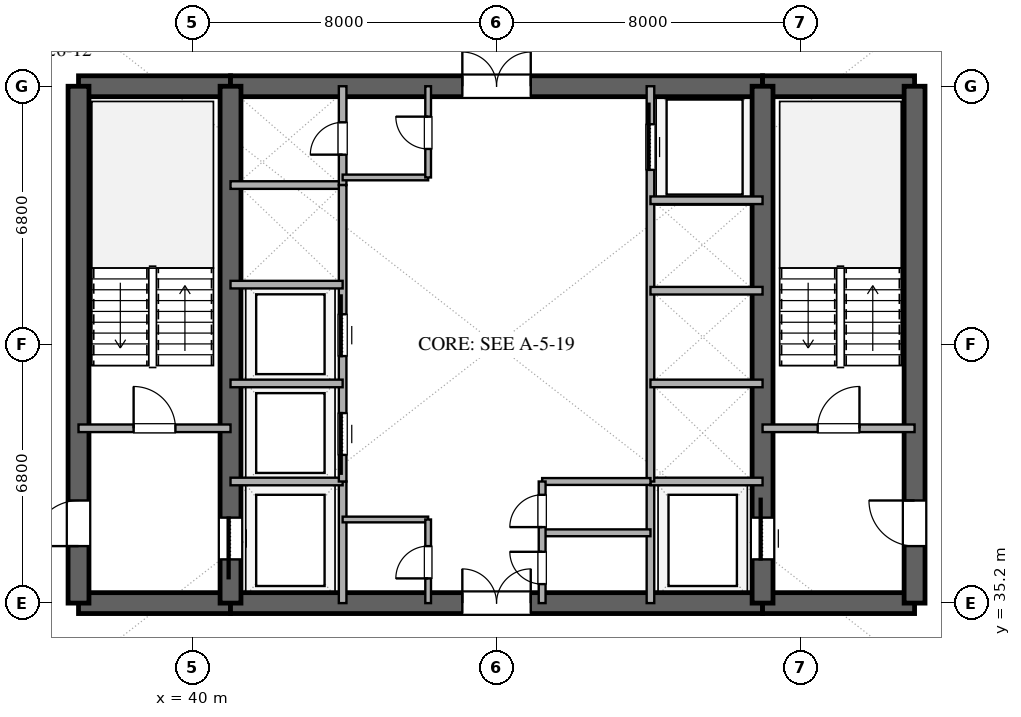
"""IFC4 building model, lengths in metres.
Left out: names, types, materials, properties, quantities, classifications, styles, units other than length and angle.
Written with IfcOpenShell. Run it as: python <this file> out.ifc"""

import sys

from ifc_helpers import new_model, si_unit, direction, frame, frame_2d, origin, place, context, subcontext, project, spatial, rectangle, extrude, element, fill, save


model = new_model("IFC4")
c1 = context("Model", 3, precision=1e-05, world=origin(), true_north=direction((0.0, 1.0)))
c2 = subcontext(c1, "Body", "Model", "MODEL_VIEW")
j1 = project(units=[si_unit("LENGTHUNIT", "METRE"), si_unit("PLANEANGLEUNIT", "RADIAN")], contexts=[c1])
p1 = place(None, origin())
s1 = spatial("IfcSite", under=j1, at=p1, CompositionType="ELEMENT")
p2 = place(p1, origin())
s2 = spatial("IfcBuilding", under=s1, at=p2, CompositionType="ELEMENT")
p3 = place(p2, frame((0.0, 0.0, 105.6)))
s3 = spatial("IfcBuildingStorey", under=s2, at=p3, CompositionType="ELEMENT", Elevation=105.6)
p4 = place(p3, frame((37.0, 35.2, 0.0), z_axis=(0.0, 0.0, 1.0), x_axis=(1.0, 0.0, 0.0)))
e1 = element("IfcWall", 1, at=p4, inside=s3, PredefinedType="SHEAR", context=c2, shape_type="SweptSolid", body=[
    extrude(rectangle(XDim=4.0, YDim=0.55, at=frame_2d((2.0, 0.0))), origin(), (0.0, 0.0, 1.0), 3.38),
])
p5 = place(p3, frame((41.0, 35.2, 0.0), z_axis=(0.0, 0.0, 1.0), x_axis=(1.0, 0.0, 0.0)))
e2 = element("IfcWall", 2, at=p5, inside=s3, PredefinedType="SHEAR", context=c2, shape_type="SweptSolid", body=[
    extrude(rectangle(XDim=14.0, YDim=0.55, at=frame_2d((7.0, 0.0))), origin(), (0.0, 0.0, 1.0), 3.38),
])
p6 = place(p5, frame((6.1, 0.0, 0.0)))
e3 = element("IfcOpeningElement", 3, at=p6, cuts=e2, PredefinedType="OPENING", context=c2, shape_type="SweptSolid", body=[
    extrude(rectangle(XDim=1.8, YDim=2.25, at=frame_2d((0.9, 1.125))), frame((0.0, 0.285, 0.0), z_axis=(0.0, -1.0, 0.0), x_axis=(1.0, 0.0, 0.0)), (0.0, 0.0, 1.0), 0.57),
])
for number, where, z_axis, x_axis in (
    (4, (55.0, 35.2, 0.0), (0.0, 0.0, 1.0), (1.0, 0.0, 0.0)),
    (5, (37.0, 48.8, 0.0), (0.0, 0.0, 1.0), (1.0, 0.0, 0.0)),
):
    element("IfcWall", number, at=place(p3, frame(where, z_axis=z_axis, x_axis=x_axis)), inside=s3, PredefinedType="SHEAR", context=c2, shape_type="SweptSolid", body=[
        extrude(rectangle(XDim=4.0, YDim=0.55, at=frame_2d((2.0, 0.0))), origin(), (0.0, 0.0, 1.0), 3.38),
    ])
p7 = place(p3, frame((41.0, 48.8, 0.0), z_axis=(0.0, 0.0, 1.0), x_axis=(1.0, 0.0, 0.0)))
e6 = element("IfcWall", 6, at=p7, inside=s3, PredefinedType="SHEAR", context=c2, shape_type="SweptSolid", body=[
    extrude(rectangle(XDim=14.0, YDim=0.55, at=frame_2d((7.0, 0.0))), origin(), (0.0, 0.0, 1.0), 3.38),
])
p8 = place(p7, frame((6.1, 0.0, 0.0)))
e7 = element("IfcOpeningElement", 7, at=p8, cuts=e6, PredefinedType="OPENING", context=c2, shape_type="SweptSolid", body=[
    extrude(rectangle(XDim=1.8, YDim=2.25, at=frame_2d((0.9, 1.125))), frame((0.0, 0.285, 0.0), z_axis=(0.0, -1.0, 0.0), x_axis=(1.0, 0.0, 0.0)), (0.0, 0.0, 1.0), 0.57),
])
p9 = place(p3, frame((55.0, 48.8, 0.0), z_axis=(0.0, 0.0, 1.0), x_axis=(1.0, 0.0, 0.0)))
e8 = element("IfcWall", 8, at=p9, inside=s3, PredefinedType="SHEAR", context=c2, shape_type="SweptSolid", body=[
    extrude(rectangle(XDim=4.0, YDim=0.55, at=frame_2d((2.0, 0.0))), origin(), (0.0, 0.0, 1.0), 3.38),
])
p10 = place(p3, frame((37.0, 35.2, 0.0), z_axis=(0.0, 0.0, 1.0), x_axis=(0.0, 1.0, 0.0)))
e9 = element("IfcWall", 9, at=p10, inside=s3, PredefinedType="SHEAR", context=c2, shape_type="SweptSolid", body=[
    extrude(rectangle(XDim=13.6, YDim=0.55, at=frame_2d((6.8, 0.0))), origin(), (0.0, 0.0, 1.0), 3.38),
])
p11 = place(p10, frame((1.5, 0.0, 0.0)))
e10 = element("IfcOpeningElement", 10, at=p11, cuts=e9, PredefinedType="OPENING", context=c2, shape_type="SweptSolid", body=[
    extrude(rectangle(XDim=1.2, YDim=2.15, at=frame_2d((0.6, 1.075))), frame((0.0, 0.285, 0.0), z_axis=(0.0, -1.0, 0.0), x_axis=(1.0, 0.0, 0.0)), (0.0, 0.0, 1.0), 0.57),
])
p12 = place(p3, frame((59.0, 35.2, 0.0), z_axis=(0.0, 0.0, 1.0), x_axis=(0.0, 1.0, 0.0)))
e11 = element("IfcWall", 11, at=p12, inside=s3, PredefinedType="SHEAR", context=c2, shape_type="SweptSolid", body=[
    extrude(rectangle(XDim=13.6, YDim=0.55, at=frame_2d((6.8, 0.0))), origin(), (0.0, 0.0, 1.0), 3.38),
])
p13 = place(p12, frame((1.5, 0.0, 0.0)))
e12 = element("IfcOpeningElement", 12, at=p13, cuts=e11, PredefinedType="OPENING", context=c2, shape_type="SweptSolid", body=[
    extrude(rectangle(XDim=1.2, YDim=2.15, at=frame_2d((0.6, 1.075))), frame((0.0, 0.285, 0.0), z_axis=(0.0, -1.0, 0.0), x_axis=(1.0, 0.0, 0.0)), (0.0, 0.0, 1.0), 0.57),
])
p14 = place(p3, frame((41.0, 35.2, 0.0), z_axis=(0.0, 0.0, 1.0), x_axis=(0.0, 1.0, 0.0)))
e13 = element("IfcWall", 13, at=p14, inside=s3, PredefinedType="SHEAR", context=c2, shape_type="SweptSolid", body=[
    extrude(rectangle(XDim=13.6, YDim=0.55, at=frame_2d((6.8, 0.0))), origin(), (0.0, 0.0, 1.0), 3.38),
])
p15 = place(p14, frame((1.15, 0.0, 0.0)))
e14 = element("IfcOpeningElement", 14, at=p15, cuts=e13, PredefinedType="OPENING", context=c2, shape_type="SweptSolid", body=[
    extrude(rectangle(XDim=1.1, YDim=2.2, at=frame_2d((0.55, 1.1))), frame((0.0, 0.285, 0.0), z_axis=(0.0, -1.0, 0.0), x_axis=(1.0, 0.0, 0.0)), (0.0, 0.0, 1.0), 0.57),
])
p16 = place(p3, frame((55.0, 35.2, 0.0), z_axis=(0.0, 0.0, 1.0), x_axis=(0.0, 1.0, 0.0)))
e15 = element("IfcWall", 15, at=p16, inside=s3, PredefinedType="SHEAR", context=c2, shape_type="SweptSolid", body=[
    extrude(rectangle(XDim=13.6, YDim=0.55, at=frame_2d((6.8, 0.0))), origin(), (0.0, 0.0, 1.0), 3.38),
])
p17 = place(p16, frame((1.15, 0.0, 0.0)))
e16 = element("IfcOpeningElement", 16, at=p17, cuts=e15, PredefinedType="OPENING", context=c2, shape_type="SweptSolid", body=[
    extrude(rectangle(XDim=1.1, YDim=2.2, at=frame_2d((0.55, 1.1))), frame((0.0, 0.285, 0.0), z_axis=(0.0, -1.0, 0.0), x_axis=(1.0, 0.0, 0.0)), (0.0, 0.0, 1.0), 0.57),
])
p18 = place(p3, frame((37.0, 39.8, 0.0), z_axis=(0.0, 0.0, 1.0), x_axis=(1.0, 0.0, 0.0)))
e17 = element("IfcWall", 17, at=p18, inside=s3, PredefinedType="SOLIDWALL", context=c2, shape_type="SweptSolid", body=[
    extrude(rectangle(XDim=4.0, YDim=0.2, at=frame_2d((2.0, 0.0))), origin(), (0.0, 0.0, 1.0), 2.74),
])
p19 = place(p18, frame((1.45, 0.0, 0.0)))
e18 = element("IfcOpeningElement", 18, at=p19, cuts=e17, PredefinedType="OPENING", context=c2, shape_type="SweptSolid", body=[
    extrude(rectangle(XDim=1.1, YDim=2.15, at=frame_2d((0.55, 1.075))), frame((0.0, 0.11, 0.0), z_axis=(0.0, -1.0, 0.0), x_axis=(1.0, 0.0, 0.0)), (0.0, 0.0, 1.0), 0.22),
])
p20 = place(p3, frame((55.0, 39.8, 0.0), z_axis=(0.0, 0.0, 1.0), x_axis=(1.0, 0.0, 0.0)))
e19 = element("IfcWall", 19, at=p20, inside=s3, PredefinedType="SOLIDWALL", context=c2, shape_type="SweptSolid", body=[
    extrude(rectangle(XDim=4.0, YDim=0.2, at=frame_2d((2.0, 0.0))), origin(), (0.0, 0.0, 1.0), 2.74),
])
p21 = place(p20, frame((1.45, 0.0, 0.0)))
e20 = element("IfcOpeningElement", 20, at=p21, cuts=e19, PredefinedType="OPENING", context=c2, shape_type="SweptSolid", body=[
    extrude(rectangle(XDim=1.1, YDim=2.15, at=frame_2d((0.55, 1.075))), frame((0.0, 0.11, 0.0), z_axis=(0.0, -1.0, 0.0), x_axis=(1.0, 0.0, 0.0)), (0.0, 0.0, 1.0), 0.22),
])
p22 = place(p3, frame((43.95, 35.2, 0.0), z_axis=(0.0, 0.0, 1.0), x_axis=(0.0, 1.0, 0.0)))
e21 = element("IfcWall", 21, at=p22, inside=s3, PredefinedType="SOLIDWALL", context=c2, shape_type="SweptSolid", body=[
    extrude(rectangle(XDim=3.2, YDim=0.2, at=frame_2d((1.6, 0.0))), origin(), (0.0, 0.0, 1.0), 2.74),
])
p23 = place(p3, frame((41.0, 38.4, 0.0), z_axis=(0.0, 0.0, 1.0), x_axis=(1.0, 0.0, 0.0)))
e22 = element("IfcWall", 22, at=p23, inside=s3, PredefinedType="SOLIDWALL", context=c2, shape_type="SweptSolid", body=[
    extrude(rectangle(XDim=2.95, YDim=0.2, at=frame_2d((1.475, 0.0))), origin(), (0.0, 0.0, 1.0), 2.74),
])
p24 = place(p3, frame((52.05, 35.2, 0.0), z_axis=(0.0, 0.0, 1.0), x_axis=(0.0, 1.0, 0.0)))
e23 = element("IfcWall", 23, at=p24, inside=s3, PredefinedType="SOLIDWALL", context=c2, shape_type="SweptSolid", body=[
    extrude(rectangle(XDim=3.2, YDim=0.2, at=frame_2d((1.6, 0.0))), origin(), (0.0, 0.0, 1.0), 2.74),
])
for number, where, z_axis, x_axis in (
    (24, (52.05, 38.4, 0.0), (0.0, 0.0, 1.0), (1.0, 0.0, 0.0)),
    (25, (41.0, 46.2, 0.0), (0.0, 0.0, 1.0), (1.0, 0.0, 0.0)),
):
    element("IfcWall", number, at=place(p3, frame(where, z_axis=z_axis, x_axis=x_axis)), inside=s3, PredefinedType="SOLIDWALL", context=c2, shape_type="SweptSolid", body=[
        extrude(rectangle(XDim=2.95, YDim=0.2, at=frame_2d((1.475, 0.0))), origin(), (0.0, 0.0, 1.0), 2.74),
    ])
p25 = place(p3, frame((43.95, 46.2, 0.0), z_axis=(0.0, 0.0, 1.0), x_axis=(0.0, 1.0, 0.0)))
e26 = element("IfcWall", 26, at=p25, inside=s3, PredefinedType="SOLIDWALL", context=c2, shape_type="SweptSolid", body=[
    extrude(rectangle(XDim=2.6, YDim=0.2, at=frame_2d((1.3, 0.0))), origin(), (0.0, 0.0, 1.0), 2.74),
])
p26 = place(p25, frame((0.8, 0.0, 0.0)))
e27 = element("IfcOpeningElement", 27, at=p26, cuts=e26, PredefinedType="OPENING", context=c2, shape_type="SweptSolid", body=[
    extrude(rectangle(XDim=0.85, YDim=2.15, at=frame_2d((0.425, 1.075))), frame((0.0, 0.11, 0.0), z_axis=(0.0, -1.0, 0.0), x_axis=(1.0, 0.0, 0.0)), (0.0, 0.0, 1.0), 0.22),
])
p27 = place(p3, frame((43.95, 38.4, 0.0), z_axis=(0.0, 0.0, 1.0), x_axis=(0.0, 1.0, 0.0)))
e28 = element("IfcWall", 28, at=p27, inside=s3, PredefinedType="SOLIDWALL", context=c2, shape_type="SweptSolid", body=[
    extrude(rectangle(XDim=7.8, YDim=0.2, at=frame_2d((3.9, 0.0))), origin(), (0.0, 0.0, 1.0), 2.74),
])
p28 = place(p27, frame((0.7, 0.0, 0.0)))
e29 = element("IfcOpeningElement", 29, at=p28, cuts=e28, PredefinedType="OPENING", context=c2, shape_type="SweptSolid", body=[
    extrude(rectangle(XDim=1.1, YDim=2.2, at=frame_2d((0.55, 1.1))), frame((0.0, 0.11, 0.0), z_axis=(0.0, -1.0, 0.0), x_axis=(1.0, 0.0, 0.0)), (0.0, 0.0, 1.0), 0.22),
])
p29 = place(p27, frame((3.3, 0.0, 0.0)))
e30 = element("IfcOpeningElement", 30, at=p29, cuts=e28, PredefinedType="OPENING", context=c2, shape_type="SweptSolid", body=[
    extrude(rectangle(XDim=1.1, YDim=2.2, at=frame_2d((0.55, 1.1))), frame((0.0, 0.11, 0.0), z_axis=(0.0, -1.0, 0.0), x_axis=(1.0, 0.0, 0.0)), (0.0, 0.0, 1.0), 0.22),
])
for number, where, z_axis, x_axis in (
    (31, (41.0, 40.98, 0.0), (0.0, 0.0, 1.0), (1.0, 0.0, 0.0)),
    (32, (41.0, 43.58, 0.0), (0.0, 0.0, 1.0), (1.0, 0.0, 0.0)),
):
    element("IfcWall", number, at=place(p3, frame(where, z_axis=z_axis, x_axis=x_axis)), inside=s3, PredefinedType="SOLIDWALL", context=c2, shape_type="SweptSolid", body=[
        extrude(rectangle(XDim=2.95, YDim=0.2, at=frame_2d((1.475, 0.0))), origin(), (0.0, 0.0, 1.0), 2.74),
    ])
p30 = place(p3, frame((52.05, 38.4, 0.0), z_axis=(0.0, 0.0, 1.0), x_axis=(0.0, 1.0, 0.0)))
e33 = element("IfcWall", 33, at=p30, inside=s3, PredefinedType="SOLIDWALL", context=c2, shape_type="SweptSolid", body=[
    extrude(rectangle(XDim=10.4, YDim=0.2, at=frame_2d((5.2, 0.0))), origin(), (0.0, 0.0, 1.0), 2.74),
])
p31 = place(p30, frame((8.2, 0.0, 0.0)))
e34 = element("IfcOpeningElement", 34, at=p31, cuts=e33, PredefinedType="OPENING", context=c2, shape_type="SweptSolid", body=[
    extrude(rectangle(XDim=1.2, YDim=2.2, at=frame_2d((0.6, 1.1))), frame((0.0, 0.11, 0.0), z_axis=(0.0, -1.0, 0.0), x_axis=(1.0, 0.0, 0.0)), (0.0, 0.0, 1.0), 0.22),
])
for number, where, z_axis, x_axis in (
    (35, (52.05, 40.98, 0.0), (0.0, 0.0, 1.0), (1.0, 0.0, 0.0)),
    (36, (52.05, 43.42, 0.0), (0.0, 0.0, 1.0), (1.0, 0.0, 0.0)),
    (37, (52.05, 45.8, 0.0), (0.0, 0.0, 1.0), (1.0, 0.0, 0.0)),
):
    element("IfcWall", number, at=place(p3, frame(where, z_axis=z_axis, x_axis=x_axis)), inside=s3, PredefinedType="SOLIDWALL", context=c2, shape_type="SweptSolid", body=[
        extrude(rectangle(XDim=2.95, YDim=0.2, at=frame_2d((1.475, 0.0))), origin(), (0.0, 0.0, 1.0), 2.74),
    ])
p32 = place(p3, frame((43.95, 37.4, 0.0), z_axis=(0.0, 0.0, 1.0), x_axis=(1.0, 0.0, 0.0)))
e38 = element("IfcWall", 38, at=p32, inside=s3, PredefinedType="PARTITIONING", context=c2, shape_type="SweptSolid", body=[
    extrude(rectangle(XDim=2.25, YDim=0.15, at=frame_2d((1.125, 0.0))), origin(), (0.0, 0.0, 1.0), 2.74),
])
p33 = place(p3, frame((46.2, 35.2, 0.0), z_axis=(0.0, 0.0, 1.0), x_axis=(0.0, 1.0, 0.0)))
e39 = element("IfcWall", 39, at=p33, inside=s3, PredefinedType="PARTITIONING", context=c2, shape_type="SweptSolid", body=[
    extrude(rectangle(XDim=2.2, YDim=0.15, at=frame_2d((1.1, 0.0))), origin(), (0.0, 0.0, 1.0), 2.74),
])
p34 = place(p33, frame((0.65, 0.0, 0.0)))
e40 = element("IfcOpeningElement", 40, at=p34, cuts=e39, PredefinedType="OPENING", context=c2, shape_type="SweptSolid", body=[
    extrude(rectangle(XDim=0.85, YDim=2.15, at=frame_2d((0.425, 1.075))), frame((0.0, 0.085, 0.0), z_axis=(0.0, -1.0, 0.0), x_axis=(1.0, 0.0, 0.0)), (0.0, 0.0, 1.0), 0.17),
])
p35 = place(p3, frame((43.95, 46.4, 0.0), z_axis=(0.0, 0.0, 1.0), x_axis=(1.0, 0.0, 0.0)))
e41 = element("IfcWall", 41, at=p35, inside=s3, PredefinedType="PARTITIONING", context=c2, shape_type="SweptSolid", body=[
    extrude(rectangle(XDim=2.25, YDim=0.15, at=frame_2d((1.125, 0.0))), origin(), (0.0, 0.0, 1.0), 2.74),
])
p36 = place(p3, frame((46.2, 46.4, 0.0), z_axis=(0.0, 0.0, 1.0), x_axis=(0.0, 1.0, 0.0)))
e42 = element("IfcWall", 42, at=p36, inside=s3, PredefinedType="PARTITIONING", context=c2, shape_type="SweptSolid", body=[
    extrude(rectangle(XDim=2.4, YDim=0.15, at=frame_2d((1.2, 0.0))), origin(), (0.0, 0.0, 1.0), 2.74),
])
p37 = place(p36, frame((0.75, 0.0, 0.0)))
e43 = element("IfcOpeningElement", 43, at=p37, cuts=e42, PredefinedType="OPENING", context=c2, shape_type="SweptSolid", body=[
    extrude(rectangle(XDim=0.85, YDim=2.15, at=frame_2d((0.425, 1.075))), frame((0.0, 0.085, 0.0), z_axis=(0.0, -1.0, 0.0), x_axis=(1.0, 0.0, 0.0)), (0.0, 0.0, 1.0), 0.17),
])
for number, where, z_axis, x_axis in (
    (44, (49.2, 37.05, 0.0), (0.0, 0.0, 1.0), (1.0, 0.0, 0.0)),
    (45, (49.2, 38.4, 0.0), (0.0, 0.0, 1.0), (1.0, 0.0, 0.0)),
):
    element("IfcWall", number, at=place(p3, frame(where, z_axis=z_axis, x_axis=x_axis)), inside=s3, PredefinedType="PLUMBINGWALL", context=c2, shape_type="SweptSolid", body=[
        extrude(rectangle(XDim=2.85, YDim=0.18, at=frame_2d((1.425, 0.0))), origin(), (0.0, 0.0, 1.0), 2.74),
    ])
p38 = place(p3, frame((49.2, 35.2, 0.0), z_axis=(0.0, 0.0, 1.0), x_axis=(0.0, 1.0, 0.0)))
e46 = element("IfcWall", 46, at=p38, inside=s3, PredefinedType="PLUMBINGWALL", context=c2, shape_type="SweptSolid", body=[
    extrude(rectangle(XDim=3.2, YDim=0.18, at=frame_2d((1.6, 0.0))), origin(), (0.0, 0.0, 1.0), 2.74),
])
p39 = place(p38, frame((0.5, 0.0, 0.0)))
e47 = element("IfcOpeningElement", 47, at=p39, cuts=e46, PredefinedType="OPENING", context=c2, shape_type="SweptSolid", body=[
    extrude(rectangle(XDim=0.85, YDim=2.1, at=frame_2d((0.425, 1.05))), frame((0.0, 0.1, 0.0), z_axis=(0.0, -1.0, 0.0), x_axis=(1.0, 0.0, 0.0)), (0.0, 0.0, 1.0), 0.2),
])
p40 = place(p38, frame((2.0, 0.0, 0.0)))
e48 = element("IfcOpeningElement", 48, at=p40, cuts=e46, PredefinedType="OPENING", context=c2, shape_type="SweptSolid", body=[
    extrude(rectangle(XDim=0.85, YDim=2.15, at=frame_2d((0.425, 1.075))), frame((0.0, 0.1, 0.0), z_axis=(0.0, -1.0, 0.0), x_axis=(1.0, 0.0, 0.0)), (0.0, 0.0, 1.0), 0.2),
])
p41 = place(p15, origin())
e49 = element("IfcDoor", 49, at=p41, inside=s3, OperationType="SLIDING_TO_LEFT", PredefinedType="DOOR", context=c2, shape_type="SweptSolid", body=[
    extrude(rectangle(XDim=1.1, YDim=2.2, at=frame_2d((0.55, 1.1))), frame((0.0, 0.025, 0.0), z_axis=(0.0, -1.0, 0.0), x_axis=(1.0, 0.0, 0.0)), (0.0, 0.0, 1.0), 0.05),
])
fill(e14, e49)
p42 = place(p17, origin())
e50 = element("IfcDoor", 50, at=p42, inside=s3, OperationType="SLIDING_TO_RIGHT", PredefinedType="DOOR", context=c2, shape_type="SweptSolid", body=[
    extrude(rectangle(XDim=1.1, YDim=2.2, at=frame_2d((0.55, 1.1))), frame((0.0, 0.025, 0.0), z_axis=(0.0, -1.0, 0.0), x_axis=(1.0, 0.0, 0.0)), (0.0, 0.0, 1.0), 0.05),
])
fill(e16, e50)
p43 = place(p11, origin())
e51 = element("IfcDoor", 51, at=p43, inside=s3, OperationType="SINGLE_SWING_LEFT", PredefinedType="DOOR", context=c2, shape_type="SweptSolid", body=[
    extrude(rectangle(XDim=1.2, YDim=2.15, at=frame_2d((0.6, 1.075))), frame((0.0, 0.025, 0.0), z_axis=(0.0, -1.0, 0.0), x_axis=(1.0, 0.0, 0.0)), (0.0, 0.0, 1.0), 0.05),
])
fill(e10, e51)
p44 = place(p13, origin())
e52 = element("IfcDoor", 52, at=p44, inside=s3, OperationType="SINGLE_SWING_RIGHT", PredefinedType="DOOR", context=c2, shape_type="SweptSolid", body=[
    extrude(rectangle(XDim=1.2, YDim=2.15, at=frame_2d((0.6, 1.075))), frame((0.0, 0.025, 0.0), z_axis=(0.0, -1.0, 0.0), x_axis=(1.0, 0.0, 0.0)), (0.0, 0.0, 1.0), 0.05),
])
fill(e12, e52)
p45 = place(p6, origin())
e53 = element("IfcDoor", 53, at=p45, inside=s3, OperationType="DOUBLE_DOOR_SINGLE_SWING", PredefinedType="DOOR", context=c2, shape_type="SweptSolid", body=[
    extrude(rectangle(XDim=1.8, YDim=2.25, at=frame_2d((0.9, 1.125))), frame((0.0, 0.025, 0.0), z_axis=(0.0, -1.0, 0.0), x_axis=(1.0, 0.0, 0.0)), (0.0, 0.0, 1.0), 0.05),
])
fill(e3, e53)
p46 = place(p8, origin())
e54 = element("IfcDoor", 54, at=p46, inside=s3, OperationType="DOUBLE_DOOR_SINGLE_SWING", PredefinedType="DOOR", context=c2, shape_type="SweptSolid", body=[
    extrude(rectangle(XDim=1.8, YDim=2.25, at=frame_2d((0.9, 1.125))), frame((0.0, 0.025, 0.0), z_axis=(0.0, -1.0, 0.0), x_axis=(1.0, 0.0, 0.0)), (0.0, 0.0, 1.0), 0.05),
])
fill(e7, e54)
p47 = place(p19, origin())
e55 = element("IfcDoor", 55, at=p47, inside=s3, OperationType="SINGLE_SWING_LEFT", PredefinedType="DOOR", context=c2, shape_type="SweptSolid", body=[
    extrude(rectangle(XDim=1.1, YDim=2.15, at=frame_2d((0.55, 1.075))), frame((0.0, 0.025, 0.0), z_axis=(0.0, -1.0, 0.0), x_axis=(1.0, 0.0, 0.0)), (0.0, 0.0, 1.0), 0.05),
])
fill(e18, e55)
p48 = place(p21, origin())
e56 = element("IfcDoor", 56, at=p48, inside=s3, OperationType="SINGLE_SWING_RIGHT", PredefinedType="DOOR", context=c2, shape_type="SweptSolid", body=[
    extrude(rectangle(XDim=1.1, YDim=2.15, at=frame_2d((0.55, 1.075))), frame((0.0, 0.025, 0.0), z_axis=(0.0, -1.0, 0.0), x_axis=(1.0, 0.0, 0.0)), (0.0, 0.0, 1.0), 0.05),
])
fill(e20, e56)
p49 = place(p26, origin())
e57 = element("IfcDoor", 57, at=p49, inside=s3, OperationType="SINGLE_SWING_LEFT", PredefinedType="DOOR", context=c2, shape_type="SweptSolid", body=[
    extrude(rectangle(XDim=0.85, YDim=2.15, at=frame_2d((0.425, 1.075))), frame((0.0, 0.025, 0.0), z_axis=(0.0, -1.0, 0.0), x_axis=(1.0, 0.0, 0.0)), (0.0, 0.0, 1.0), 0.05),
])
fill(e27, e57)
p50 = place(p28, origin())
e58 = element("IfcDoor", 58, at=p50, inside=s3, OperationType="SLIDING_TO_LEFT", PredefinedType="DOOR", context=c2, shape_type="SweptSolid", body=[
    extrude(rectangle(XDim=1.1, YDim=2.2, at=frame_2d((0.55, 1.1))), frame((0.0, 0.025, 0.0), z_axis=(0.0, -1.0, 0.0), x_axis=(1.0, 0.0, 0.0)), (0.0, 0.0, 1.0), 0.05),
])
fill(e29, e58)
p51 = place(p29, origin())
e59 = element("IfcDoor", 59, at=p51, inside=s3, OperationType="SLIDING_TO_RIGHT", PredefinedType="DOOR", context=c2, shape_type="SweptSolid", body=[
    extrude(rectangle(XDim=1.1, YDim=2.2, at=frame_2d((0.55, 1.1))), frame((0.0, 0.025, 0.0), z_axis=(0.0, -1.0, 0.0), x_axis=(1.0, 0.0, 0.0)), (0.0, 0.0, 1.0), 0.05),
])
fill(e30, e59)
p52 = place(p31, origin())
e60 = element("IfcDoor", 60, at=p52, inside=s3, OperationType="SLIDING_TO_RIGHT", PredefinedType="DOOR", context=c2, shape_type="SweptSolid", body=[
    extrude(rectangle(XDim=1.2, YDim=2.2, at=frame_2d((0.6, 1.1))), frame((0.0, 0.025, 0.0), z_axis=(0.0, -1.0, 0.0), x_axis=(1.0, 0.0, 0.0)), (0.0, 0.0, 1.0), 0.05),
])
fill(e34, e60)
p53 = place(p34, origin())
e61 = element("IfcDoor", 61, at=p53, inside=s3, OperationType="SINGLE_SWING_LEFT", PredefinedType="DOOR", context=c2, shape_type="SweptSolid", body=[
    extrude(rectangle(XDim=0.85, YDim=2.15, at=frame_2d((0.425, 1.075))), frame((0.0, 0.025, 0.0), z_axis=(0.0, -1.0, 0.0), x_axis=(1.0, 0.0, 0.0)), (0.0, 0.0, 1.0), 0.05),
])
fill(e40, e61)
p54 = place(p37, origin())
e62 = element("IfcDoor", 62, at=p54, inside=s3, OperationType="SINGLE_SWING_RIGHT", PredefinedType="DOOR", context=c2, shape_type="SweptSolid", body=[
    extrude(rectangle(XDim=0.85, YDim=2.15, at=frame_2d((0.425, 1.075))), frame((0.0, 0.025, 0.0), z_axis=(0.0, -1.0, 0.0), x_axis=(1.0, 0.0, 0.0)), (0.0, 0.0, 1.0), 0.05),
])
fill(e43, e62)
p55 = place(p39, origin())
e63 = element("IfcDoor", 63, at=p55, inside=s3, OperationType="SINGLE_SWING_RIGHT", PredefinedType="DOOR", context=c2, shape_type="SweptSolid", body=[
    extrude(rectangle(XDim=0.85, YDim=2.1, at=frame_2d((0.425, 1.05))), frame((0.0, 0.025, 0.0), z_axis=(0.0, -1.0, 0.0), x_axis=(1.0, 0.0, 0.0)), (0.0, 0.0, 1.0), 0.05),
])
fill(e47, e63)
p56 = place(p40, origin())
e64 = element("IfcDoor", 64, at=p56, inside=s3, OperationType="SINGLE_SWING_LEFT", PredefinedType="DOOR", context=c2, shape_type="SweptSolid", body=[
    extrude(rectangle(XDim=0.85, YDim=2.15, at=frame_2d((0.425, 1.075))), frame((0.0, 0.025, 0.0), z_axis=(0.0, -1.0, 0.0), x_axis=(1.0, 0.0, 0.0)), (0.0, 0.0, 1.0), 0.05),
])
fill(e48, e64)
save(model, sys.argv[1])
